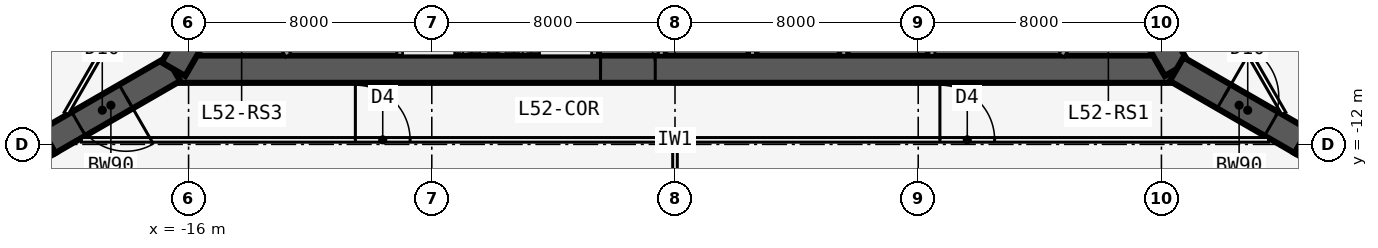
"""IFC4 building model, lengths in metres.
Left out: names, types, materials, properties, quantities, classifications, styles, units other than length and angle.
Written with IfcOpenShell. Run it as: python <this file> out.ifc"""

import sys

from ifc_helpers import new_model, si_unit, direction, frame, frame_2d, origin, place, context, subcontext, project, spatial, rectangle, extrude, element, fill, save


model = new_model("IFC4")
c1 = context("Model", 3, precision=1e-05, world=origin(), true_north=direction((0.0, 1.0)))
c2 = subcontext(c1, "Body", "Model", "MODEL_VIEW")
j1 = project(units=[si_unit("LENGTHUNIT", "METRE"), si_unit("PLANEANGLEUNIT", "RADIAN")], contexts=[c1])
p1 = place(None, origin())
s1 = spatial("IfcSite", under=j1, at=p1, CompositionType="ELEMENT")
p2 = place(p1, origin())
s2 = spatial("IfcBuilding", under=s1, at=p2, CompositionType="ELEMENT")
p3 = place(p2, frame((0.0, 0.0, 195.9)))
s3 = spatial("IfcBuildingStorey", under=s2, at=p3, CompositionType="ELEMENT", Elevation=195.9)
p4 = place(p3, frame((-16.5, -9.526, 0.0), z_axis=(0.0, 0.0, 1.0), x_axis=(1.0, 0.0, 0.0)))
e1 = element("IfcWall", 1, at=p4, inside=s3, PredefinedType="SHEAR", context=c2, shape_type="SweptSolid", body=[
    extrude(rectangle(XDim=33.0, YDim=0.9, at=frame_2d((16.5, 0.0))), origin(), (0.0, 0.0, 1.0), 5.0),
])
p5 = place(p4, frame((14.05, 0.0, 0.0)))
e2 = element("IfcOpeningElement", 2, at=p5, cuts=e1, PredefinedType="OPENING", context=c2, shape_type="SweptSolid", body=[
    extrude(rectangle(XDim=1.8, YDim=2.13, at=frame_2d((0.9, 1.065))), frame((0.0, 0.46, 0.0), z_axis=(0.0, -1.0, 0.0), x_axis=(1.0, 0.0, 0.0)), (0.0, 0.0, 1.0), 0.92),
])
p6 = place(p3, frame((-9.05, -5.951, 0.0), z_axis=(0.0, 0.0, 1.0), x_axis=(0.0, -1.0, 0.0)))
e3 = element("IfcWall", 3, at=p6, inside=s3, PredefinedType="SOLIDWALL", context=c2, shape_type="SweptSolid", body=[
    extrude(rectangle(XDim=3.125, YDim=0.2, at=frame_2d((1.562, 0.0))), origin(), (0.0, 0.0, 1.0), 4.835),
])
p7 = place(p3, frame((-2.65, -5.951, 0.0), z_axis=(0.0, 0.0, 1.0), x_axis=(0.0, -1.0, 0.0)))
e4 = element("IfcWall", 4, at=p7, inside=s3, PredefinedType="SOLIDWALL", context=c2, shape_type="SweptSolid", body=[
    extrude(rectangle(XDim=3.125, YDim=0.2, at=frame_2d((1.562, 0.0))), origin(), (0.0, 0.0, 1.0), 4.835),
])
p8 = place(p7, frame((1.525, 0.0, 0.0)))
e5 = element("IfcOpeningElement", 5, at=p8, cuts=e4, PredefinedType="OPENING", context=c2, shape_type="SweptSolid", body=[
    extrude(rectangle(XDim=1.0, YDim=2.13, at=frame_2d((0.5, 1.065))), frame((0.0, 0.11, 0.0), z_axis=(0.0, -1.0, 0.0), x_axis=(1.0, 0.0, 0.0)), (0.0, 0.0, 1.0), 0.22),
])
for number, where, z_axis, x_axis in (
    (6, (-0.45, -5.951, 0.0), (0.0, 0.0, 1.0), (0.0, -1.0, 0.0)),
    (7, (2.55, -5.951, 0.0), (0.0, 0.0, 1.0), (0.0, -1.0, 0.0)),
    (8, (5.55, -5.951, 0.0), (0.0, 0.0, 1.0), (0.0, -1.0, 0.0)),
    (9, (8.45, -5.951, 0.0), (0.0, 0.0, 1.0), (0.0, -1.0, 0.0)),
):
    element("IfcWall", number, at=place(p3, frame(where, z_axis=z_axis, x_axis=x_axis)), inside=s3, PredefinedType="SOLIDWALL", context=c2, shape_type="SweptSolid", body=[
        extrude(rectangle(XDim=3.125, YDim=0.2, at=frame_2d((1.562, 0.0))), origin(), (0.0, 0.0, 1.0), 4.835),
    ])
p9 = place(p3, frame((16.5, -9.526, 0.0), z_axis=(0.0, 0.0, 1.0), x_axis=(-0.499999749417, 0.866025548458, 0.0)))
e10 = element("IfcWall", 10, at=p9, inside=s3, PredefinedType="SHEAR", context=c2, shape_type="SweptSolid", body=[
    extrude(rectangle(XDim=33.0, YDim=0.9, at=frame_2d((16.5, 0.0))), origin(), (0.0, 0.0, 1.0), 5.0),
])
p10 = place(p9, frame((14.15, 0.0, 0.0)))
e11 = element("IfcOpeningElement", 11, at=p10, cuts=e10, PredefinedType="OPENING", context=c2, shape_type="SweptSolid", body=[
    extrude(rectangle(XDim=1.8, YDim=2.13, at=frame_2d((0.9, 1.065))), frame((0.0, 0.46, 0.0), z_axis=(0.0, -1.0, 0.0), x_axis=(1.0, 0.0, 0.0)), (0.0, 0.0, 1.0), 0.92),
])
p11 = place(p9, frame((12.6, 0.0, 0.0)))
e12 = element("IfcOpeningElement", 12, at=p11, cuts=e10, PredefinedType="OPENING", context=c2, shape_type="SweptSolid", body=[
    extrude(rectangle(XDim=1.0, YDim=2.13, at=frame_2d((0.5, 1.065))), frame((0.0, 0.46, 0.0), z_axis=(0.0, -1.0, 0.0), x_axis=(1.0, 0.0, 0.0)), (0.0, 0.0, 1.0), 0.92),
])
p12 = place(p3, frame((0.0, 19.052, 0.0), z_axis=(0.0, 0.0, 1.0), x_axis=(-0.499999749417, -0.866025548458, 0.0)))
e13 = element("IfcWall", 13, at=p12, inside=s3, PredefinedType="SHEAR", context=c2, shape_type="SweptSolid", body=[
    extrude(rectangle(XDim=33.0, YDim=0.9, at=frame_2d((16.5, 0.0))), origin(), (0.0, 0.0, 1.0), 5.0),
])
p13 = place(p12, frame((14.15, 0.0, 0.0)))
e14 = element("IfcOpeningElement", 14, at=p13, cuts=e13, PredefinedType="OPENING", context=c2, shape_type="SweptSolid", body=[
    extrude(rectangle(XDim=1.8, YDim=2.13, at=frame_2d((0.9, 1.065))), frame((0.0, 0.46, 0.0), z_axis=(0.0, -1.0, 0.0), x_axis=(1.0, 0.0, 0.0)), (0.0, 0.0, 1.0), 0.92),
])
p14 = place(p12, frame((12.6, 0.0, 0.0)))
e15 = element("IfcOpeningElement", 15, at=p14, cuts=e13, PredefinedType="OPENING", context=c2, shape_type="SweptSolid", body=[
    extrude(rectangle(XDim=1.0, YDim=2.13, at=frame_2d((0.5, 1.065))), frame((0.0, 0.46, 0.0), z_axis=(0.0, -1.0, 0.0), x_axis=(1.0, 0.0, 0.0)), (0.0, 0.0, 1.0), 0.92),
])
p15 = place(p3, frame((16.5, -9.526, 0.0), z_axis=(0.0, 0.0, 1.0), x_axis=(0.866031398331, -0.499989616998, 0.0)))
e16 = element("IfcWall", 16, at=p15, inside=s3, PredefinedType="SHEAR", context=c2, shape_type="SweptSolid", body=[
    extrude(rectangle(XDim=4.746, YDim=0.9, at=frame_2d((2.373, 0.0))), origin(), (0.0, 0.0, 1.0), 5.0),
])
p16 = place(p15, frame((1.8, 0.0, 0.0)))
e17 = element("IfcOpeningElement", 17, at=p16, cuts=e16, PredefinedType="OPENING", context=c2, shape_type="SweptSolid", body=[
    extrude(rectangle(XDim=1.8, YDim=2.13, at=frame_2d((0.9, 1.065))), frame((0.0, 0.46, 0.0), z_axis=(0.0, -1.0, 0.0), x_axis=(1.0, 0.0, 0.0)), (0.0, 0.0, 1.0), 0.92),
])
p17 = place(p3, frame((20.61, -11.899, 0.0), z_axis=(0.0, 0.0, 1.0), x_axis=(0.866009537788, -0.500027479704, 0.0)))
e18 = element("IfcWall", 18, at=p17, inside=s3, PredefinedType="SHEAR", context=c2, shape_type="SweptSolid", body=[
    extrude(rectangle(XDim=1.155, YDim=0.9, at=frame_2d((0.577, 0.0))), origin(), (0.0, 0.0, 1.0), 5.0),
])
p18 = place(p3, frame((-16.5, -9.526, 0.0), z_axis=(0.0, 0.0, 1.0), x_axis=(-0.866031398331, -0.499989616998, 0.0)))
e19 = element("IfcWall", 19, at=p18, inside=s3, PredefinedType="SHEAR", context=c2, shape_type="SweptSolid", body=[
    extrude(rectangle(XDim=4.746, YDim=0.9, at=frame_2d((2.373, 0.0))), origin(), (0.0, 0.0, 1.0), 5.0),
])
p19 = place(p18, frame((1.8, 0.0, 0.0)))
e20 = element("IfcOpeningElement", 20, at=p19, cuts=e19, PredefinedType="OPENING", context=c2, shape_type="SweptSolid", body=[
    extrude(rectangle(XDim=1.8, YDim=2.13, at=frame_2d((0.9, 1.065))), frame((0.0, 0.46, 0.0), z_axis=(0.0, -1.0, 0.0), x_axis=(1.0, 0.0, 0.0)), (0.0, 0.0, 1.0), 0.92),
])
p20 = place(p3, frame((-20.61, -11.899, 0.0), z_axis=(0.0, 0.0, 1.0), x_axis=(-0.866009537788, -0.500027479704, 0.0)))
e21 = element("IfcWall", 21, at=p20, inside=s3, PredefinedType="SHEAR", context=c2, shape_type="SweptSolid", body=[
    extrude(rectangle(XDim=1.155, YDim=0.9, at=frame_2d((0.577, 0.0))), origin(), (0.0, 0.0, 1.0), 5.0),
])
p21 = place(p3, frame((-19.527, -11.851, 0.0), z_axis=(0.0, 0.0, 1.0), x_axis=(1.0, 0.0, 0.0)))
e22 = element("IfcWall", 22, at=p21, inside=s3, PredefinedType="PARTITIONING", context=c2, shape_type="SweptSolid", body=[
    extrude(rectangle(XDim=39.054, YDim=0.15, at=frame_2d((19.527, 0.0))), origin(), (0.0, 0.0, 1.0), 4.835),
])
p22 = place(p21, frame((9.013, 0.0, 0.0)))
e23 = element("IfcOpeningElement", 23, at=p22, cuts=e22, PredefinedType="OPENING", context=c2, shape_type="SweptSolid", body=[
    extrude(rectangle(XDim=1.8, YDim=2.13, at=frame_2d((0.9, 1.065))), frame((0.0, 0.085, 0.0), z_axis=(0.0, -1.0, 0.0), x_axis=(1.0, 0.0, 0.0)), (0.0, 0.0, 1.0), 0.17),
])
p23 = place(p21, frame((28.24, 0.0, 0.0)))
e24 = element("IfcOpeningElement", 24, at=p23, cuts=e22, PredefinedType="OPENING", context=c2, shape_type="SweptSolid", body=[
    extrude(rectangle(XDim=1.8, YDim=2.13, at=frame_2d((0.9, 1.065))), frame((0.0, 0.085, 0.0), z_axis=(0.0, -1.0, 0.0), x_axis=(1.0, 0.0, 0.0)), (0.0, 0.0, 1.0), 0.17),
])
p24 = place(p3, frame((0.0, -11.926, 0.0), z_axis=(0.0, 0.0, 1.0), x_axis=(0.0, -1.0, 0.0)))
e25 = element("IfcWall", 25, at=p24, inside=s3, PredefinedType="PARTITIONING", context=c2, shape_type="SweptSolid", body=[
    extrude(rectangle(XDim=8.101, YDim=0.15, at=frame_2d((4.051, 0.0))), origin(), (0.0, 0.0, 1.0), 3.989),
])
p25 = place(p3, frame((20.027, -10.985, 0.0), z_axis=(0.0, 0.0, 1.0), x_axis=(-0.500001677587, 0.866024435227, 0.0)))
e26 = element("IfcWall", 26, at=p25, inside=s3, PredefinedType="PARTITIONING", context=c2, shape_type="SweptSolid", body=[
    extrude(rectangle(XDim=39.054, YDim=0.15, at=frame_2d((19.527, 0.0))), origin(), (0.0, 0.0, 1.0), 4.835),
])
p26 = place(p25, frame((4.414, 0.0, 0.0)))
e27 = element("IfcOpeningElement", 27, at=p26, cuts=e26, PredefinedType="OPENING", context=c2, shape_type="SweptSolid", body=[
    extrude(rectangle(XDim=1.0, YDim=2.13, at=frame_2d((0.5, 1.065))), frame((0.0, 0.085, 0.0), z_axis=(0.0, -1.0, 0.0), x_axis=(1.0, 0.0, 0.0)), (0.0, 0.0, 1.0), 0.17),
])
p27 = place(p25, frame((14.027, 0.0, 0.0)))
e28 = element("IfcOpeningElement", 28, at=p27, cuts=e26, PredefinedType="OPENING", context=c2, shape_type="SweptSolid", body=[
    extrude(rectangle(XDim=1.0, YDim=2.13, at=frame_2d((0.5, 1.065))), frame((0.0, 0.085, 0.0), z_axis=(0.0, -1.0, 0.0), x_axis=(1.0, 0.0, 0.0)), (0.0, 0.0, 1.0), 0.17),
])
p28 = place(p25, frame((24.027, 0.0, 0.0)))
e29 = element("IfcOpeningElement", 29, at=p28, cuts=e26, PredefinedType="OPENING", context=c2, shape_type="SweptSolid", body=[
    extrude(rectangle(XDim=1.0, YDim=2.13, at=frame_2d((0.5, 1.065))), frame((0.0, 0.085, 0.0), z_axis=(0.0, -1.0, 0.0), x_axis=(1.0, 0.0, 0.0)), (0.0, 0.0, 1.0), 0.17),
])
p29 = place(p25, frame((33.64, 0.0, 0.0)))
e30 = element("IfcOpeningElement", 30, at=p29, cuts=e26, PredefinedType="OPENING", context=c2, shape_type="SweptSolid", body=[
    extrude(rectangle(XDim=1.0, YDim=2.13, at=frame_2d((0.5, 1.065))), frame((0.0, 0.085, 0.0), z_axis=(0.0, -1.0, 0.0), x_axis=(1.0, 0.0, 0.0)), (0.0, 0.0, 1.0), 0.17),
])
p30 = place(p3, frame((-0.5, 22.836, 0.0), z_axis=(0.0, 0.0, 1.0), x_axis=(-0.500001677587, -0.866024435227, 0.0)))
e31 = element("IfcWall", 31, at=p30, inside=s3, PredefinedType="PARTITIONING", context=c2, shape_type="SweptSolid", body=[
    extrude(rectangle(XDim=39.054, YDim=0.15, at=frame_2d((19.527, 0.0))), origin(), (0.0, 0.0, 1.0), 4.835),
])
p31 = place(p30, frame((4.414, 0.0, 0.0)))
e32 = element("IfcOpeningElement", 32, at=p31, cuts=e31, PredefinedType="OPENING", context=c2, shape_type="SweptSolid", body=[
    extrude(rectangle(XDim=1.0, YDim=2.13, at=frame_2d((0.5, 1.065))), frame((0.0, 0.085, 0.0), z_axis=(0.0, -1.0, 0.0), x_axis=(1.0, 0.0, 0.0)), (0.0, 0.0, 1.0), 0.17),
])
p32 = place(p30, frame((10.527, 0.0, 0.0)))
e33 = element("IfcOpeningElement", 33, at=p32, cuts=e31, PredefinedType="OPENING", context=c2, shape_type="SweptSolid", body=[
    extrude(rectangle(XDim=1.0, YDim=2.13, at=frame_2d((0.5, 1.065))), frame((0.0, 0.085, 0.0), z_axis=(0.0, -1.0, 0.0), x_axis=(1.0, 0.0, 0.0)), (0.0, 0.0, 1.0), 0.17),
])
p33 = place(p30, frame((15.527, 0.0, 0.0)))
e34 = element("IfcOpeningElement", 34, at=p33, cuts=e31, PredefinedType="OPENING", context=c2, shape_type="SweptSolid", body=[
    extrude(rectangle(XDim=1.0, YDim=2.13, at=frame_2d((0.5, 1.065))), frame((0.0, 0.085, 0.0), z_axis=(0.0, -1.0, 0.0), x_axis=(1.0, 0.0, 0.0)), (0.0, 0.0, 1.0), 0.17),
])
p34 = place(p30, frame((24.027, 0.0, 0.0)))
e35 = element("IfcOpeningElement", 35, at=p34, cuts=e31, PredefinedType="OPENING", context=c2, shape_type="SweptSolid", body=[
    extrude(rectangle(XDim=1.0, YDim=2.13, at=frame_2d((0.5, 1.065))), frame((0.0, 0.085, 0.0), z_axis=(0.0, -1.0, 0.0), x_axis=(1.0, 0.0, 0.0)), (0.0, 0.0, 1.0), 0.17),
])
p35 = place(p30, frame((33.64, 0.0, 0.0)))
e36 = element("IfcOpeningElement", 36, at=p35, cuts=e31, PredefinedType="OPENING", context=c2, shape_type="SweptSolid", body=[
    extrude(rectangle(XDim=1.0, YDim=2.13, at=frame_2d((0.5, 1.065))), frame((0.0, 0.085, 0.0), z_axis=(0.0, -1.0, 0.0), x_axis=(1.0, 0.0, 0.0)), (0.0, 0.0, 1.0), 0.17),
])
for number, where, z_axis, x_axis in (
    (37, (14.219, -6.476, 0.0), (0.0, 0.0, 1.0), (-0.5, -0.866, 0.0)),
    (38, (-12.719, -9.076, 0.0), (0.0, 0.0, 1.0), (-0.5, 0.866, 0.0)),
):
    element("IfcWall", number, at=place(p3, frame(where, z_axis=z_axis, x_axis=x_axis)), inside=s3, PredefinedType="SOLIDWALL", context=c2, shape_type="SweptSolid", body=[
        extrude(rectangle(XDim=3.002, YDim=0.2, at=frame_2d((1.501, 0.0))), origin(), (0.0, 0.0, 1.0), 4.835),
    ])
p36 = place(p22, origin())
e39 = element("IfcDoor", 39, at=p36, inside=s3, OperationType="DOUBLE_DOOR_SINGLE_SWING", PredefinedType="DOOR", context=c2, shape_type="SweptSolid", body=[
    extrude(rectangle(XDim=1.8, YDim=2.13, at=frame_2d((0.9, 1.065))), frame((0.0, 0.025, 0.0), z_axis=(0.0, -1.0, 0.0), x_axis=(1.0, 0.0, 0.0)), (0.0, 0.0, 1.0), 0.05),
])
fill(e23, e39)
p37 = place(p23, origin())
e40 = element("IfcDoor", 40, at=p37, inside=s3, OperationType="DOUBLE_DOOR_SINGLE_SWING", PredefinedType="DOOR", context=c2, shape_type="SweptSolid", body=[
    extrude(rectangle(XDim=1.8, YDim=2.13, at=frame_2d((0.9, 1.065))), frame((0.0, 0.025, 0.0), z_axis=(0.0, -1.0, 0.0), x_axis=(1.0, 0.0, 0.0)), (0.0, 0.0, 1.0), 0.05),
])
fill(e24, e40)
p38 = place(p5, origin())
e41 = element("IfcDoor", 41, at=p38, inside=s3, OperationType="DOUBLE_DOOR_SINGLE_SWING", PredefinedType="DOOR", context=c2, shape_type="SweptSolid", body=[
    extrude(rectangle(XDim=1.8, YDim=2.13, at=frame_2d((0.9, 1.065))), frame((0.0, 0.025, 0.0), z_axis=(0.0, -1.0, 0.0), x_axis=(1.0, 0.0, 0.0)), (0.0, 0.0, 1.0), 0.05),
])
fill(e2, e41)
p39 = place(p16, origin())
e42 = element("IfcDoor", 42, at=p39, inside=s3, OperationType="DOUBLE_DOOR_DOUBLE_SWING", PredefinedType="DOOR", context=c2, shape_type="SweptSolid", body=[
    extrude(rectangle(XDim=1.8, YDim=2.13, at=frame_2d((0.9, 1.065))), frame((0.0, 0.025, 0.0), z_axis=(0.0, -1.0, 0.0), x_axis=(1.0, 0.0, 0.0)), (0.0, 0.0, 1.0), 0.05),
])
fill(e17, e42)
p40 = place(p19, origin())
e43 = element("IfcDoor", 43, at=p40, inside=s3, OperationType="DOUBLE_DOOR_DOUBLE_SWING", PredefinedType="DOOR", context=c2, shape_type="SweptSolid", body=[
    extrude(rectangle(XDim=1.8, YDim=2.13, at=frame_2d((0.9, 1.065))), frame((0.0, 0.025, 0.0), z_axis=(0.0, -1.0, 0.0), x_axis=(1.0, 0.0, 0.0)), (0.0, 0.0, 1.0), 0.05),
])
fill(e20, e43)
save(model, sys.argv[1])
